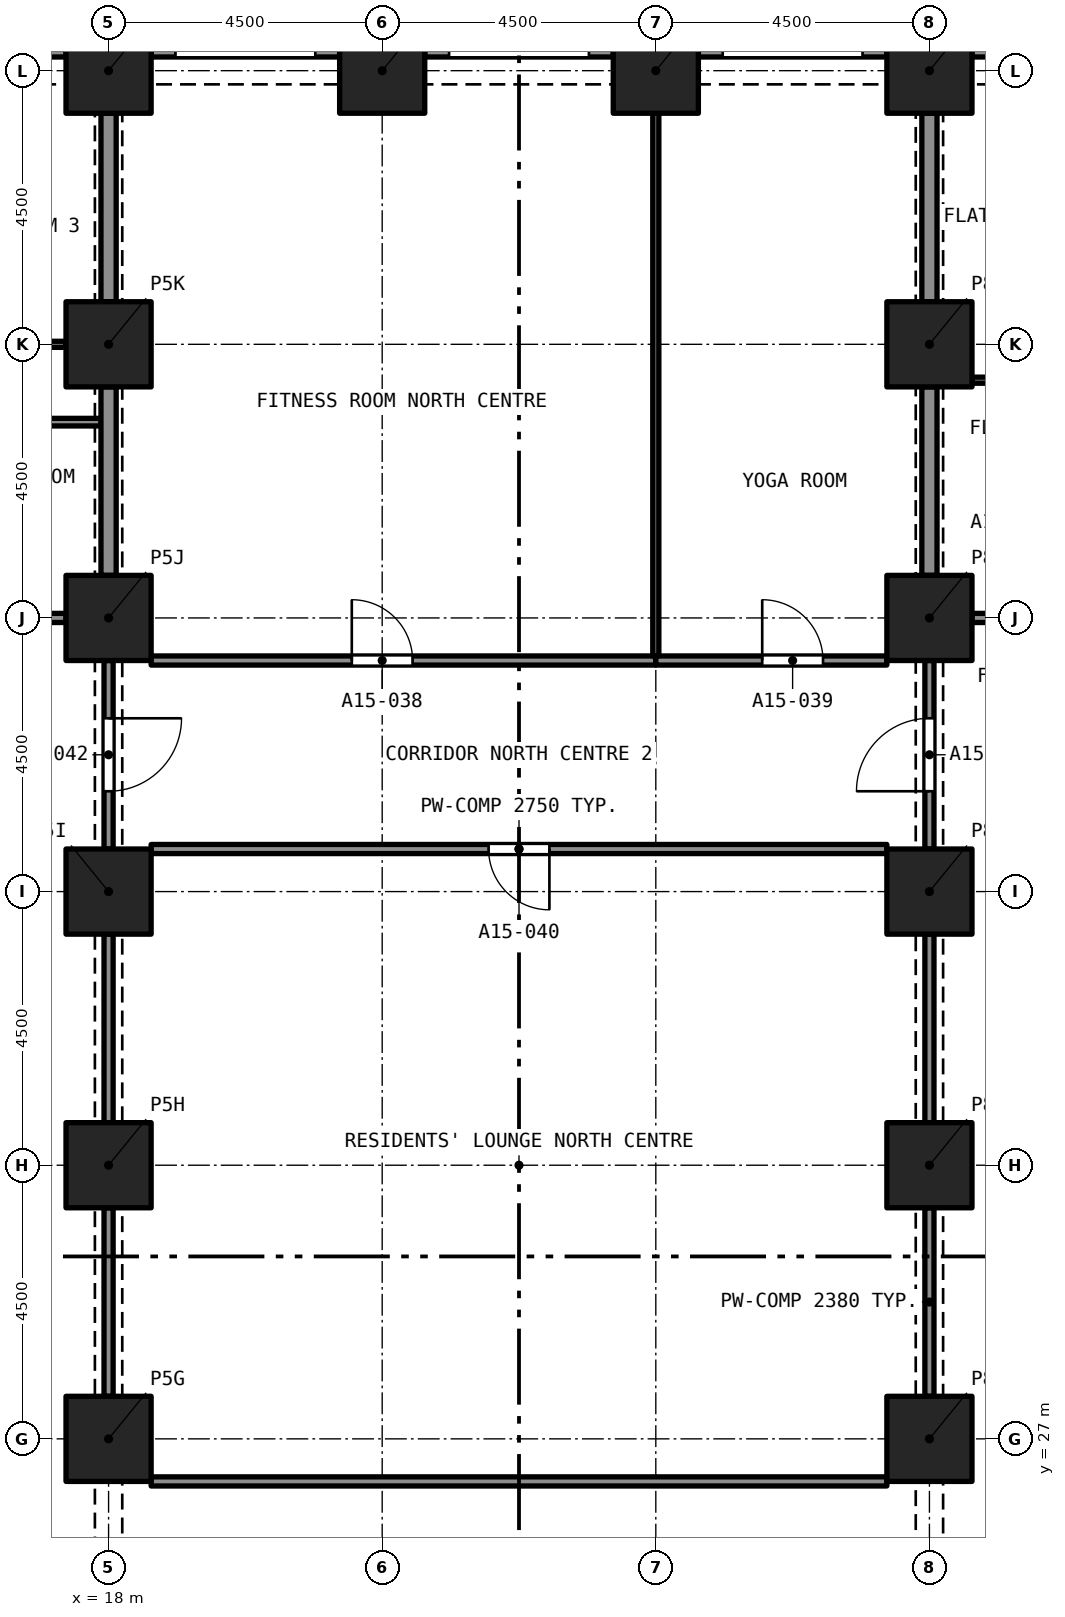
"""IFC4 building model, lengths in metres.
Left out: names, types, materials, properties, quantities, classifications, styles, units other than length and angle.
Written with IfcOpenShell. Run it as: python <this file> out.ifc"""

import sys

from ifc_helpers import new_model, si_unit, direction, frame, frame_2d, origin, origin_2d, place, context, subcontext, project, spatial, rectangle, extrude, element, fill, save


model = new_model("IFC4")
c1 = context("Model", 3, precision=1e-05, world=origin(), true_north=direction((0.0, 1.0)))
c2 = subcontext(c1, "Body", "Model", "MODEL_VIEW")
j1 = project(units=[si_unit("LENGTHUNIT", "METRE"), si_unit("PLANEANGLEUNIT", "RADIAN")], contexts=[c1])
p1 = place(None, origin())
s1 = spatial("IfcSite", under=j1, at=p1, CompositionType="ELEMENT")
p2 = place(p1, origin())
s2 = spatial("IfcBuilding", under=s1, at=p2, CompositionType="ELEMENT")
p3 = place(p2, frame((0.0, 0.0, 59.2)))
s3 = spatial("IfcBuildingStorey", under=s2, at=p3, CompositionType="ELEMENT", Elevation=59.2)
for number, where, z_axis, x_axis in (
    (1, (18.0, 27.0, 0.0), (0.0, 0.0, 1.0), (1.0, 0.0, 0.0)),
    (2, (31.5, 27.0, 0.0), (0.0, 0.0, 1.0), (1.0, 0.0, 0.0)),
    (3, (18.0, 31.5, 0.0), (0.0, 0.0, 1.0), (1.0, 0.0, 0.0)),
    (4, (31.5, 31.5, 0.0), (0.0, 0.0, 1.0), (1.0, 0.0, 0.0)),
    (5, (18.0, 36.0, 0.0), (0.0, 0.0, 1.0), (1.0, 0.0, 0.0)),
    (6, (31.5, 36.0, 0.0), (0.0, 0.0, 1.0), (1.0, 0.0, 0.0)),
    (7, (18.0, 40.5, 0.0), (0.0, 0.0, 1.0), (1.0, 0.0, 0.0)),
    (8, (31.5, 40.5, 0.0), (0.0, 0.0, 1.0), (1.0, 0.0, 0.0)),
    (9, (18.0, 45.0, 0.0), (0.0, 0.0, 1.0), (1.0, 0.0, 0.0)),
    (10, (31.5, 45.0, 0.0), (0.0, 0.0, 1.0), (1.0, 0.0, 0.0)),
    (11, (18.0, 49.5, 0.0), (0.0, 0.0, 1.0), (1.0, 0.0, 0.0)),
    (12, (22.5, 49.5, 0.0), (0.0, 0.0, 1.0), (1.0, 0.0, 0.0)),
    (13, (27.0, 49.5, 0.0), (0.0, 0.0, 1.0), (1.0, 0.0, 0.0)),
    (14, (31.5, 49.5, 0.0), (0.0, 0.0, 1.0), (1.0, 0.0, 0.0)),
):
    element("IfcColumn", number, at=place(p3, frame(where, z_axis=z_axis, x_axis=x_axis)), inside=s3, PredefinedType="COLUMN", context=c2, shape_type="SweptSolid", body=[
        extrude(rectangle(XDim=1.4, YDim=1.4, at=origin_2d()), origin(), (0.0, 0.0, 1.0), 3.2),
    ])
p4 = place(p3, frame((32.2, 49.875, 0.0), z_axis=(0.0, 0.0, 1.0), x_axis=(1.0, 0.0, 0.0)))
e15 = element("IfcWall", 15, at=p4, inside=s3, PredefinedType="SOLIDWALL", context=c2, shape_type="SweptSolid", body=[
    extrude(rectangle(XDim=3.1, YDim=0.3, at=frame_2d((1.55, 0.0))), origin(), (0.0, 0.0, 1.0), 3.2),
])
p5 = place(p4, frame((0.4, 0.0, 0.45)))
e16 = element("IfcOpeningElement", 16, at=p5, cuts=e15, PredefinedType="OPENING", context=c2, shape_type="SweptSolid", body=[
    extrude(rectangle(XDim=2.3, YDim=1.95, at=frame_2d((1.15, 0.975))), frame((0.0, 0.16, 0.0), z_axis=(0.0, -1.0, 0.0), x_axis=(1.0, 0.0, 0.0)), (0.0, 0.0, 1.0), 0.32),
])
p6 = place(p3, frame((27.7, 49.875, 0.0), z_axis=(0.0, 0.0, 1.0), x_axis=(1.0, 0.0, 0.0)))
e17 = element("IfcWall", 17, at=p6, inside=s3, PredefinedType="SOLIDWALL", context=c2, shape_type="SweptSolid", body=[
    extrude(rectangle(XDim=3.1, YDim=0.3, at=frame_2d((1.55, 0.0))), origin(), (0.0, 0.0, 1.0), 3.2),
])
p7 = place(p6, frame((0.4, 0.0, 0.45)))
e18 = element("IfcOpeningElement", 18, at=p7, cuts=e17, PredefinedType="OPENING", context=c2, shape_type="SweptSolid", body=[
    extrude(rectangle(XDim=2.3, YDim=1.95, at=frame_2d((1.15, 0.975))), frame((0.0, 0.16, 0.0), z_axis=(0.0, -1.0, 0.0), x_axis=(1.0, 0.0, 0.0)), (0.0, 0.0, 1.0), 0.32),
])
p8 = place(p3, frame((23.2, 49.875, 0.0), z_axis=(0.0, 0.0, 1.0), x_axis=(1.0, 0.0, 0.0)))
e19 = element("IfcWall", 19, at=p8, inside=s3, PredefinedType="SOLIDWALL", context=c2, shape_type="SweptSolid", body=[
    extrude(rectangle(XDim=3.1, YDim=0.3, at=frame_2d((1.55, 0.0))), origin(), (0.0, 0.0, 1.0), 3.2),
])
p9 = place(p8, frame((0.4, 0.0, 0.45)))
e20 = element("IfcOpeningElement", 20, at=p9, cuts=e19, PredefinedType="OPENING", context=c2, shape_type="SweptSolid", body=[
    extrude(rectangle(XDim=2.3, YDim=1.95, at=frame_2d((1.15, 0.975))), frame((0.0, 0.16, 0.0), z_axis=(0.0, -1.0, 0.0), x_axis=(1.0, 0.0, 0.0)), (0.0, 0.0, 1.0), 0.32),
])
p10 = place(p3, frame((18.7, 49.875, 0.0), z_axis=(0.0, 0.0, 1.0), x_axis=(1.0, 0.0, 0.0)))
e21 = element("IfcWall", 21, at=p10, inside=s3, PredefinedType="SOLIDWALL", context=c2, shape_type="SweptSolid", body=[
    extrude(rectangle(XDim=3.1, YDim=0.3, at=frame_2d((1.55, 0.0))), origin(), (0.0, 0.0, 1.0), 3.2),
])
p11 = place(p10, frame((0.4, 0.0, 0.45)))
e22 = element("IfcOpeningElement", 22, at=p11, cuts=e21, PredefinedType="OPENING", context=c2, shape_type="SweptSolid", body=[
    extrude(rectangle(XDim=2.3, YDim=1.95, at=frame_2d((1.15, 0.975))), frame((0.0, 0.16, 0.0), z_axis=(0.0, -1.0, 0.0), x_axis=(1.0, 0.0, 0.0)), (0.0, 0.0, 1.0), 0.32),
])
p12 = place(p3, frame((14.2, 49.875, 0.0), z_axis=(0.0, 0.0, 1.0), x_axis=(1.0, 0.0, 0.0)))
e23 = element("IfcWall", 23, at=p12, inside=s3, PredefinedType="SOLIDWALL", context=c2, shape_type="SweptSolid", body=[
    extrude(rectangle(XDim=3.1, YDim=0.3, at=frame_2d((1.55, 0.0))), origin(), (0.0, 0.0, 1.0), 3.2),
])
p13 = place(p12, frame((0.4, 0.0, 0.45)))
e24 = element("IfcOpeningElement", 24, at=p13, cuts=e23, PredefinedType="OPENING", context=c2, shape_type="SweptSolid", body=[
    extrude(rectangle(XDim=2.3, YDim=1.95, at=frame_2d((1.15, 0.975))), frame((0.0, 0.16, 0.0), z_axis=(0.0, -1.0, 0.0), x_axis=(1.0, 0.0, 0.0)), (0.0, 0.0, 1.0), 0.32),
])
p14 = place(p3, frame((17.875, 43.72, 0.0), z_axis=(0.0, 0.0, 1.0), x_axis=(-1.0, 0.0, 0.0)))
e25 = element("IfcWall", 25, at=p14, inside=s3, PredefinedType="PARTITIONING", context=c2, shape_type="SweptSolid", body=[
    extrude(rectangle(XDim=4.357, YDim=0.125, at=frame_2d((2.178, 0.0))), origin(), (0.0, 0.0, 1.0), 2.9),
])
p15 = place(p14, frame((1.716, 0.0, 0.0)))
e26 = element("IfcOpeningElement", 26, at=p15, cuts=e25, PredefinedType="OPENING", context=c2, shape_type="SweptSolid", body=[
    extrude(rectangle(XDim=0.8, YDim=2.1, at=frame_2d((0.4, 1.05))), frame((0.0, 0.073, 0.0), z_axis=(0.0, -1.0, 0.0), x_axis=(1.0, 0.0, 0.0)), (0.0, 0.0, 1.0), 0.145),
])
p16 = place(p3, frame((18.0, 41.2, 0.0), z_axis=(0.0, 0.0, 1.0), x_axis=(0.0, 1.0, 0.0)))
e27 = element("IfcWall", 27, at=p16, inside=s3, PredefinedType="PARTITIONING", context=c2, shape_type="SweptSolid", body=[
    extrude(rectangle(XDim=3.1, YDim=0.25, at=frame_2d((1.55, 0.0))), origin(), (0.0, 0.0, 1.0), 2.38),
])
p17 = place(p3, frame((13.456, 40.5, 0.0), z_axis=(0.0, 0.0, 1.0), x_axis=(1.0, 0.0, 0.0)))
e28 = element("IfcWall", 28, at=p17, inside=s3, PredefinedType="PARTITIONING", context=c2, shape_type="SweptSolid", body=[
    extrude(rectangle(XDim=3.844, YDim=0.15, at=frame_2d((1.922, 0.0))), origin(), (0.0, 0.0, 1.0), 2.9),
])
p18 = place(p3, frame((13.5, 45.0, 0.0), z_axis=(0.0, 0.0, 1.0), x_axis=(1.0, 0.0, 0.0)))
e29 = element("IfcWall", 29, at=p18, inside=s3, PredefinedType="PARTITIONING", context=c2, shape_type="SweptSolid", body=[
    extrude(rectangle(XDim=3.8, YDim=0.1, at=frame_2d((1.9, 0.0))), origin(), (0.0, 0.0, 1.0), 2.9),
])
p19 = place(p18, frame((1.8, 0.0, 0.0)))
e30 = element("IfcOpeningElement", 30, at=p19, cuts=e29, PredefinedType="OPENING", context=c2, shape_type="SweptSolid", body=[
    extrude(rectangle(XDim=0.9, YDim=2.1, at=frame_2d((0.45, 1.05))), frame((0.0, 0.06, 0.0), z_axis=(0.0, -1.0, 0.0), x_axis=(1.0, 0.0, 0.0)), (0.0, 0.0, 1.0), 0.12),
])
p20 = place(p3, frame((18.0, 45.7, 0.0), z_axis=(0.0, 0.0, 1.0), x_axis=(0.0, 1.0, 0.0)))
e31 = element("IfcWall", 31, at=p20, inside=s3, PredefinedType="PARTITIONING", context=c2, shape_type="SweptSolid", body=[
    extrude(rectangle(XDim=3.1, YDim=0.25, at=frame_2d((1.55, 0.0))), origin(), (0.0, 0.0, 1.0), 2.38),
])
p21 = place(p3, frame((32.2, 44.41, 0.0), z_axis=(0.0, 0.0, 1.0), x_axis=(1.0, 0.0, 0.0)))
e32 = element("IfcWall", 32, at=p21, inside=s3, PredefinedType="PARTITIONING", context=c2, shape_type="SweptSolid", body=[
    extrude(rectangle(XDim=3.8, YDim=0.1, at=frame_2d((1.9, 0.0))), origin(), (0.0, 0.0, 1.0), 2.9),
])
p22 = place(p21, frame((1.05, 0.0, 0.0)))
e33 = element("IfcOpeningElement", 33, at=p22, cuts=e32, PredefinedType="OPENING", context=c2, shape_type="SweptSolid", body=[
    extrude(rectangle(XDim=1.0, YDim=2.1, at=frame_2d((0.5, 1.05))), frame((0.0, 0.06, 0.0), z_axis=(0.0, -1.0, 0.0), x_axis=(1.0, 0.0, 0.0)), (0.0, 0.0, 1.0), 0.12),
])
p23 = place(p3, frame((31.5, 41.2, 0.0), z_axis=(0.0, 0.0, 1.0), x_axis=(0.0, 1.0, 0.0)))
e34 = element("IfcWall", 34, at=p23, inside=s3, PredefinedType="PARTITIONING", context=c2, shape_type="SweptSolid", body=[
    extrude(rectangle(XDim=3.1, YDim=0.25, at=frame_2d((1.55, 0.0))), origin(), (0.0, 0.0, 1.0), 2.38),
])
p24 = place(p3, frame((32.2, 40.5, 0.0), z_axis=(0.0, 0.0, 1.0), x_axis=(1.0, 0.0, 0.0)))
e35 = element("IfcWall", 35, at=p24, inside=s3, PredefinedType="PARTITIONING", context=c2, shape_type="SweptSolid", body=[
    extrude(rectangle(XDim=2.225, YDim=0.15, at=frame_2d((1.113, 0.0))), origin(), (0.0, 0.0, 1.0), 2.9),
])
p25 = place(p24, frame((1.05, 0.0, 0.0)))
e36 = element("IfcOpeningElement", 36, at=p25, cuts=e35, PredefinedType="OPENING", context=c2, shape_type="SweptSolid", body=[
    extrude(rectangle(XDim=1.0, YDim=2.1, at=frame_2d((0.5, 1.05))), frame((0.0, 0.085, 0.0), z_axis=(0.0, -1.0, 0.0), x_axis=(1.0, 0.0, 0.0)), (0.0, 0.0, 1.0), 0.17),
])
p26 = place(p3, frame((31.5, 45.7, 0.0), z_axis=(0.0, 0.0, 1.0), x_axis=(0.0, 1.0, 0.0)))
e37 = element("IfcWall", 37, at=p26, inside=s3, PredefinedType="PARTITIONING", context=c2, shape_type="SweptSolid", body=[
    extrude(rectangle(XDim=3.1, YDim=0.25, at=frame_2d((1.55, 0.0))), origin(), (0.0, 0.0, 1.0), 2.38),
])
p27 = place(p3, frame((18.7, 39.8, 0.0), z_axis=(0.0, 0.0, 1.0), x_axis=(1.0, 0.0, 0.0)))
e38 = element("IfcWall", 38, at=p27, inside=s3, PredefinedType="PARTITIONING", context=c2, shape_type="SweptSolid", body=[
    extrude(rectangle(XDim=8.3, YDim=0.15, at=frame_2d((4.15, 0.0))), origin(), (0.0, 0.0, 1.0), 2.75),
])
p28 = place(p27, frame((3.3, 0.0, 0.0)))
e39 = element("IfcOpeningElement", 39, at=p28, cuts=e38, PredefinedType="OPENING", context=c2, shape_type="SweptSolid", body=[
    extrude(rectangle(XDim=1.0, YDim=2.1, at=frame_2d((0.5, 1.05))), frame((0.0, 0.085, 0.0), z_axis=(0.0, -1.0, 0.0), x_axis=(1.0, 0.0, 0.0)), (0.0, 0.0, 1.0), 0.17),
])
p29 = place(p3, frame((27.0, 39.8, 0.0), z_axis=(0.0, 0.0, 1.0), x_axis=(1.0, 0.0, 0.0)))
e40 = element("IfcWall", 40, at=p29, inside=s3, PredefinedType="PARTITIONING", context=c2, shape_type="SweptSolid", body=[
    extrude(rectangle(XDim=3.8, YDim=0.15, at=frame_2d((1.9, 0.0))), origin(), (0.0, 0.0, 1.0), 2.75),
])
p30 = place(p29, frame((1.75, 0.0, 0.0)))
e41 = element("IfcOpeningElement", 41, at=p30, cuts=e40, PredefinedType="OPENING", context=c2, shape_type="SweptSolid", body=[
    extrude(rectangle(XDim=1.0, YDim=2.1, at=frame_2d((0.5, 1.05))), frame((0.0, 0.085, 0.0), z_axis=(0.0, -1.0, 0.0), x_axis=(1.0, 0.0, 0.0)), (0.0, 0.0, 1.0), 0.17),
])
p31 = place(p3, frame((30.8, 36.7, 0.0), z_axis=(0.0, 0.0, 1.0), x_axis=(-1.0, 0.0, 0.0)))
e42 = element("IfcWall", 42, at=p31, inside=s3, PredefinedType="PARTITIONING", context=c2, shape_type="SweptSolid", body=[
    extrude(rectangle(XDim=12.1, YDim=0.15, at=frame_2d((6.05, 0.0))), origin(), (0.0, 0.0, 1.0), 2.75),
])
p32 = place(p31, frame((5.55, 0.0, 0.0)))
e43 = element("IfcOpeningElement", 43, at=p32, cuts=e42, PredefinedType="OPENING", context=c2, shape_type="SweptSolid", body=[
    extrude(rectangle(XDim=1.0, YDim=2.1, at=frame_2d((0.5, 1.05))), frame((0.0, 0.085, 0.0), z_axis=(0.0, -1.0, 0.0), x_axis=(1.0, 0.0, 0.0)), (0.0, 0.0, 1.0), 0.17),
])
p33 = place(p3, frame((31.5, 36.7, 0.0), z_axis=(0.0, 0.0, 1.0), x_axis=(0.0, 1.0, 0.0)))
e44 = element("IfcWall", 44, at=p33, inside=s3, PredefinedType="PARTITIONING", context=c2, shape_type="SweptSolid", body=[
    extrude(rectangle(XDim=3.1, YDim=0.15, at=frame_2d((1.55, 0.0))), origin(), (0.0, 0.0, 1.0), 2.38),
])
p34 = place(p33, frame((0.95, 0.0, 0.0)))
e45 = element("IfcOpeningElement", 45, at=p34, cuts=e44, PredefinedType="OPENING", context=c2, shape_type="SweptSolid", body=[
    extrude(rectangle(XDim=1.2, YDim=2.1, at=frame_2d((0.6, 1.05))), frame((0.0, 0.085, 0.0), z_axis=(0.0, -1.0, 0.0), x_axis=(1.0, 0.0, 0.0)), (0.0, 0.0, 1.0), 0.17),
])
p35 = place(p3, frame((18.0, 39.8, 0.0), z_axis=(0.0, 0.0, 1.0), x_axis=(0.0, -1.0, 0.0)))
e46 = element("IfcWall", 46, at=p35, inside=s3, PredefinedType="PARTITIONING", context=c2, shape_type="SweptSolid", body=[
    extrude(rectangle(XDim=3.1, YDim=0.15, at=frame_2d((1.55, 0.0))), origin(), (0.0, 0.0, 1.0), 2.38),
])
p36 = place(p35, frame((0.95, 0.0, 0.0)))
e47 = element("IfcOpeningElement", 47, at=p36, cuts=e46, PredefinedType="OPENING", context=c2, shape_type="SweptSolid", body=[
    extrude(rectangle(XDim=1.2, YDim=2.1, at=frame_2d((0.6, 1.05))), frame((0.0, 0.085, 0.0), z_axis=(0.0, -1.0, 0.0), x_axis=(1.0, 0.0, 0.0)), (0.0, 0.0, 1.0), 0.17),
])
p37 = place(p3, frame((27.0, 39.875, 0.0), z_axis=(0.0, 0.0, 1.0), x_axis=(0.0, 1.0, 0.0)))
e48 = element("IfcWall", 48, at=p37, inside=s3, PredefinedType="PARTITIONING", context=c2, shape_type="SweptSolid", body=[
    extrude(rectangle(XDim=8.925, YDim=0.1, at=frame_2d((4.462, 0.0))), origin(), (0.0, 0.0, 1.0), 2.75),
])
for number, where, z_axis, x_axis in (
    (49, (31.5, 32.2, 0.0), (0.0, 0.0, 1.0), (0.0, 1.0, 0.0)),
    (50, (31.5, 27.7, 0.0), (0.0, 0.0, 1.0), (0.0, 1.0, 0.0)),
    (51, (18.0, 27.7, 0.0), (0.0, 0.0, 1.0), (0.0, 1.0, 0.0)),
    (52, (18.0, 32.2, 0.0), (0.0, 0.0, 1.0), (0.0, 1.0, 0.0)),
):
    element("IfcWall", number, at=place(p3, frame(where, z_axis=z_axis, x_axis=x_axis)), inside=s3, PredefinedType="PARTITIONING", context=c2, shape_type="SweptSolid", body=[
        extrude(rectangle(XDim=3.1, YDim=0.15, at=frame_2d((1.55, 0.0))), origin(), (0.0, 0.0, 1.0), 2.38),
    ])
p38 = place(p3, frame((18.7, 26.3, 0.0), z_axis=(0.0, 0.0, 1.0), x_axis=(1.0, 0.0, 0.0)))
e53 = element("IfcWall", 53, at=p38, inside=s3, PredefinedType="PARTITIONING", context=c2, shape_type="SweptSolid", body=[
    extrude(rectangle(XDim=12.1, YDim=0.15, at=frame_2d((6.05, 0.0))), origin(), (0.0, 0.0, 1.0), 2.75),
])
p39 = place(p28, origin())
e54 = element("IfcDoor", 54, at=p39, inside=s3, OperationType="SINGLE_SWING_LEFT", PredefinedType="DOOR", context=c2, shape_type="SweptSolid", body=[
    extrude(rectangle(XDim=1.0, YDim=2.1, at=frame_2d((0.5, 1.05))), frame((0.0, 0.025, 0.0), z_axis=(0.0, -1.0, 0.0), x_axis=(1.0, 0.0, 0.0)), (0.0, 0.0, 1.0), 0.05),
])
fill(e39, e54)
p40 = place(p30, origin())
e55 = element("IfcDoor", 55, at=p40, inside=s3, OperationType="SINGLE_SWING_RIGHT", PredefinedType="DOOR", context=c2, shape_type="SweptSolid", body=[
    extrude(rectangle(XDim=1.0, YDim=2.1, at=frame_2d((0.5, 1.05))), frame((0.0, 0.025, 0.0), z_axis=(0.0, -1.0, 0.0), x_axis=(1.0, 0.0, 0.0)), (0.0, 0.0, 1.0), 0.05),
])
fill(e41, e55)
p41 = place(p32, origin())
e56 = element("IfcDoor", 56, at=p41, inside=s3, OperationType="SINGLE_SWING_RIGHT", PredefinedType="DOOR", context=c2, shape_type="SweptSolid", body=[
    extrude(rectangle(XDim=1.0, YDim=2.1, at=frame_2d((0.5, 1.05))), frame((0.0, 0.025, 0.0), z_axis=(0.0, -1.0, 0.0), x_axis=(1.0, 0.0, 0.0)), (0.0, 0.0, 1.0), 0.05),
])
fill(e43, e56)
p42 = place(p34, origin())
e57 = element("IfcDoor", 57, at=p42, inside=s3, OperationType="SINGLE_SWING_LEFT", PredefinedType="DOOR", context=c2, shape_type="SweptSolid", body=[
    extrude(rectangle(XDim=1.2, YDim=2.1, at=frame_2d((0.6, 1.05))), frame((0.0, 0.025, 0.0), z_axis=(0.0, -1.0, 0.0), x_axis=(1.0, 0.0, 0.0)), (0.0, 0.0, 1.0), 0.05),
])
fill(e45, e57)
p43 = place(p36, origin())
e58 = element("IfcDoor", 58, at=p43, inside=s3, OperationType="SINGLE_SWING_LEFT", PredefinedType="DOOR", context=c2, shape_type="SweptSolid", body=[
    extrude(rectangle(XDim=1.2, YDim=2.1, at=frame_2d((0.6, 1.05))), frame((0.0, 0.025, 0.0), z_axis=(0.0, -1.0, 0.0), x_axis=(1.0, 0.0, 0.0)), (0.0, 0.0, 1.0), 0.05),
])
fill(e47, e58)
save(model, sys.argv[1])
